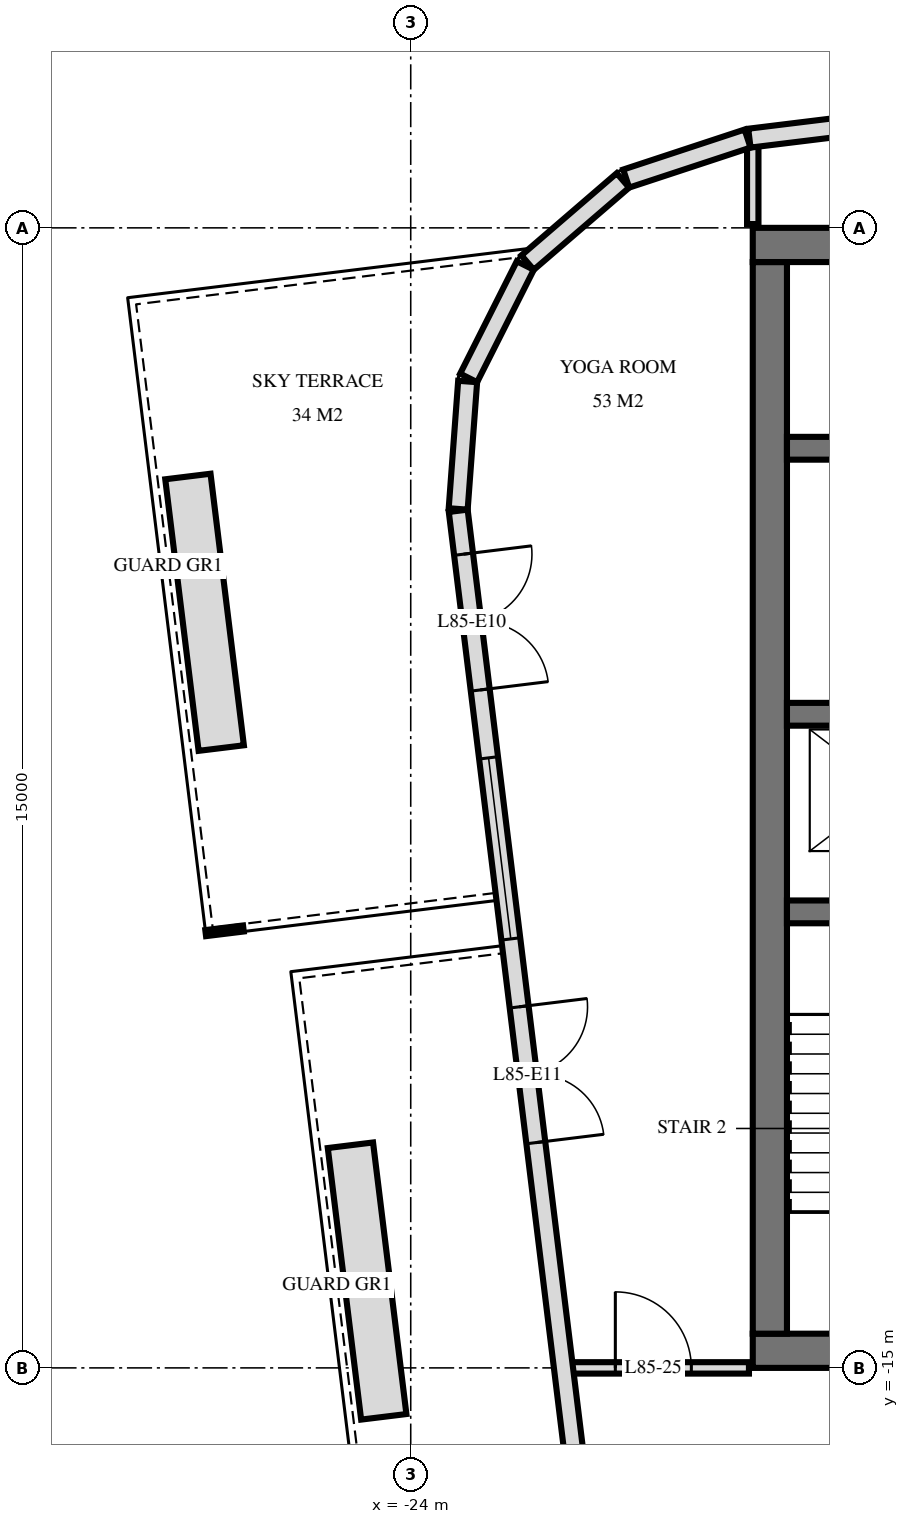
"""IFC4 building model, lengths in metres.
Left out: names, types, materials, properties, quantities, classifications, styles, units other than length and angle.
Written with IfcOpenShell. Run it as: python <this file> out.ifc"""

import sys

from ifc_helpers import new_model, si_unit, direction, frame, frame_2d, origin, place, context, subcontext, project, spatial, rectangle, extrude, element, fill, save


model = new_model("IFC4")
c1 = context("Model", 3, precision=1e-05, world=origin(), true_north=direction((0.0, 1.0)))
c2 = subcontext(c1, "Body", "Model", "MODEL_VIEW")
j1 = project(units=[si_unit("LENGTHUNIT", "METRE"), si_unit("PLANEANGLEUNIT", "RADIAN")], contexts=[c1])
p1 = place(None, origin())
s1 = spatial("IfcSite", under=j1, at=p1, CompositionType="ELEMENT")
p2 = place(p1, origin())
s2 = spatial("IfcBuilding", under=s1, at=p2, CompositionType="ELEMENT")
p3 = place(p2, frame((0.0, 0.0, 322.6)))
s3 = spatial("IfcBuildingStorey", under=s2, at=p3, CompositionType="ELEMENT", Elevation=322.6)
p4 = place(p3, frame((-19.5, -0.225, 0.0), z_axis=(0.0, 0.0, 1.0), x_axis=(1.0, 0.0, 0.0)))
e1 = element("IfcWall", 1, at=p4, inside=s3, PredefinedType="SHEAR", context=c2, shape_type="SweptSolid", body=[
    extrude(rectangle(XDim=9.5, YDim=0.45, at=frame_2d((4.75, 0.0))), origin(), (0.0, 0.0, 1.0), 4.0),
])
p5 = place(p3, frame((-19.5, -14.775, 0.0), z_axis=(0.0, 0.0, 1.0), x_axis=(1.0, 0.0, 0.0)))
e2 = element("IfcWall", 2, at=p5, inside=s3, PredefinedType="SHEAR", context=c2, shape_type="SweptSolid", body=[
    extrude(rectangle(XDim=9.5, YDim=0.45, at=frame_2d((4.75, 0.0))), origin(), (0.0, 0.0, 1.0), 4.0),
])
p6 = place(p5, frame((1.2, 0.0, 0.0)))
e3 = element("IfcOpeningElement", 3, at=p6, cuts=e2, PredefinedType="OPENING", context=c2, shape_type="SweptSolid", body=[
    extrude(rectangle(XDim=1.2, YDim=2.1, at=frame_2d((0.6, 1.05))), frame((0.0, 0.235, 0.0), z_axis=(0.0, -1.0, 0.0), x_axis=(1.0, 0.0, 0.0)), (0.0, 0.0, 1.0), 0.47),
])
p7 = place(p5, frame((4.25, 0.0, 0.0)))
e4 = element("IfcOpeningElement", 4, at=p7, cuts=e2, PredefinedType="OPENING", context=c2, shape_type="SweptSolid", body=[
    extrude(rectangle(XDim=1.1, YDim=2.1, at=frame_2d((0.55, 1.05))), frame((0.0, 0.235, 0.0), z_axis=(0.0, -1.0, 0.0), x_axis=(1.0, 0.0, 0.0)), (0.0, 0.0, 1.0), 0.47),
])
p8 = place(p3, frame((-19.275, -14.55, 0.0), z_axis=(0.0, 0.0, 1.0), x_axis=(0.0, 1.0, 0.0)))
e5 = element("IfcWall", 5, at=p8, inside=s3, PredefinedType="SHEAR", context=c2, shape_type="SweptSolid", body=[
    extrude(rectangle(XDim=14.1, YDim=0.45, at=frame_2d((7.05, 0.0))), origin(), (0.0, 0.0, 1.0), 4.0),
])
p9 = place(p3, frame((-19.05, -2.9, 0.0), z_axis=(0.0, 0.0, 1.0), x_axis=(1.0, 0.0, 0.0)))
e6 = element("IfcWall", 6, at=p9, inside=s3, PredefinedType="SHEAR", context=c2, shape_type="SweptSolid", body=[
    extrude(rectangle(XDim=8.7, YDim=0.3, at=frame_2d((4.35, 0.0))), origin(), (0.0, 0.0, 1.0), 4.0),
])
p10 = place(p9, frame((6.8, 0.0, 0.0)))
e7 = element("IfcOpeningElement", 7, at=p10, cuts=e6, PredefinedType="OPENING", context=c2, shape_type="SweptSolid", body=[
    extrude(rectangle(XDim=1.1, YDim=2.1, at=frame_2d((0.55, 1.05))), frame((0.0, 0.16, 0.0), z_axis=(0.0, -1.0, 0.0), x_axis=(1.0, 0.0, 0.0)), (0.0, 0.0, 1.0), 0.32),
])
p11 = place(p9, frame((3.8, 0.0, 0.0)))
e8 = element("IfcOpeningElement", 8, at=p11, cuts=e6, PredefinedType="OPENING", context=c2, shape_type="SweptSolid", body=[
    extrude(rectangle(XDim=1.1, YDim=2.1, at=frame_2d((0.55, 1.05))), frame((0.0, 0.16, 0.0), z_axis=(0.0, -1.0, 0.0), x_axis=(1.0, 0.0, 0.0)), (0.0, 0.0, 1.0), 0.32),
])
p12 = place(p9, frame((0.9, 0.0, 0.0)))
e9 = element("IfcOpeningElement", 9, at=p12, cuts=e6, PredefinedType="OPENING", context=c2, shape_type="SweptSolid", body=[
    extrude(rectangle(XDim=0.9, YDim=2.1, at=frame_2d((0.45, 1.05))), frame((0.0, 0.16, 0.0), z_axis=(0.0, -1.0, 0.0), x_axis=(1.0, 0.0, 0.0)), (0.0, 0.0, 1.0), 0.32),
])
p13 = place(p3, frame((-19.05, -6.4, 0.0), z_axis=(0.0, 0.0, 1.0), x_axis=(1.0, 0.0, 0.0)))
e10 = element("IfcWall", 10, at=p13, inside=s3, PredefinedType="SHEAR", context=c2, shape_type="SweptSolid", body=[
    extrude(rectangle(XDim=8.7, YDim=0.3, at=frame_2d((4.35, 0.0))), origin(), (0.0, 0.0, 1.0), 4.0),
])
p14 = place(p13, frame((0.8, 0.0, 0.0)))
e11 = element("IfcOpeningElement", 11, at=p14, cuts=e10, PredefinedType="OPENING", context=c2, shape_type="SweptSolid", body=[
    extrude(rectangle(XDim=1.1, YDim=2.1, at=frame_2d((0.55, 1.05))), frame((0.0, 0.16, 0.0), z_axis=(0.0, -1.0, 0.0), x_axis=(1.0, 0.0, 0.0)), (0.0, 0.0, 1.0), 0.32),
])
p15 = place(p3, frame((-19.05, -9.0, 0.0), z_axis=(0.0, 0.0, 1.0), x_axis=(1.0, 0.0, 0.0)))
e12 = element("IfcWall", 12, at=p15, inside=s3, PredefinedType="SHEAR", context=c2, shape_type="SweptSolid", body=[
    extrude(rectangle(XDim=8.7, YDim=0.3, at=frame_2d((4.35, 0.0))), origin(), (0.0, 0.0, 1.0), 4.0),
])
p16 = place(p15, frame((3.8, 0.0, 0.0)))
e13 = element("IfcOpeningElement", 13, at=p16, cuts=e12, PredefinedType="OPENING", context=c2, shape_type="SweptSolid", body=[
    extrude(rectangle(XDim=1.1, YDim=2.1, at=frame_2d((0.55, 1.05))), frame((0.0, 0.16, 0.0), z_axis=(0.0, -1.0, 0.0), x_axis=(1.0, 0.0, 0.0)), (0.0, 0.0, 1.0), 0.32),
])
p17 = place(p3, frame((16.138, 5.561, 0.0), z_axis=(0.0, 0.0, 1.0), x_axis=(-0.992546726876, -0.121864658405, 0.0)))
e14 = element("IfcWall", 14, at=p17, inside=s3, PredefinedType="SOLIDWALL", context=c2, shape_type="SweptSolid", body=[
    extrude(rectangle(XDim=35.951, YDim=0.25, at=frame_2d((17.975, 0.0))), origin(), (0.0, 0.0, 1.0), 3.72),
])
p18 = place(p17, frame((12.275, 0.0, 0.0)))
e15 = element("IfcOpeningElement", 15, at=p18, cuts=e14, PredefinedType="OPENING", context=c2, shape_type="SweptSolid", body=[
    extrude(rectangle(XDim=2.4, YDim=2.4, at=frame_2d((1.2, 1.2))), frame((0.0, 0.135, 0.0), z_axis=(0.0, -1.0, 0.0), x_axis=(1.0, 0.0, 0.0)), (0.0, 0.0, 1.0), 0.27),
])
p19 = place(p17, frame((17.865, 0.0, 0.0)))
e16 = element("IfcOpeningElement", 16, at=p19, cuts=e14, PredefinedType="OPENING", context=c2, shape_type="SweptSolid", body=[
    extrude(rectangle(XDim=2.4, YDim=2.4, at=frame_2d((1.2, 1.2))), frame((0.0, 0.135, 0.0), z_axis=(0.0, -1.0, 0.0), x_axis=(1.0, 0.0, 0.0)), (0.0, 0.0, 1.0), 0.27),
])
p20 = place(p17, frame((21.275, 0.0, 0.0)))
e17 = element("IfcOpeningElement", 17, at=p20, cuts=e14, PredefinedType="OPENING", context=c2, shape_type="SweptSolid", body=[
    extrude(rectangle(XDim=2.4, YDim=2.4, at=frame_2d((1.2, 1.2))), frame((0.0, 0.135, 0.0), z_axis=(0.0, -1.0, 0.0), x_axis=(1.0, 0.0, 0.0)), (0.0, 0.0, 1.0), 0.27),
])
p21 = place(p3, frame((-19.568, 1.175, 0.0), z_axis=(0.0, 0.0, 1.0), x_axis=(-0.949694735798, -0.313177120489, 0.0)))
e18 = element("IfcWall", 18, at=p21, inside=s3, PredefinedType="SOLIDWALL", context=c2, shape_type="SweptSolid", body=[
    extrude(rectangle(XDim=1.681, YDim=0.25, at=frame_2d((0.841, 0.0))), origin(), (0.0, 0.0, 1.0), 3.72),
])
p22 = place(p3, frame((-21.208, 0.624, 0.0), z_axis=(0.0, 0.0, 1.0), x_axis=(-0.757568315466, -0.652755886531, 0.0)))
e19 = element("IfcWall", 19, at=p22, inside=s3, PredefinedType="SOLIDWALL", context=c2, shape_type="SweptSolid", body=[
    extrude(rectangle(XDim=1.656, YDim=0.25, at=frame_2d((0.828, 0.0))), origin(), (0.0, 0.0, 1.0), 3.72),
])
p23 = place(p3, frame((-22.493, -0.495, 0.0), z_axis=(0.0, 0.0, 1.0), x_axis=(-0.449982385812, -0.893037430604, 0.0)))
e20 = element("IfcWall", 20, at=p23, inside=s3, PredefinedType="SOLIDWALL", context=c2, shape_type="SweptSolid", body=[
    extrude(rectangle(XDim=1.656, YDim=0.25, at=frame_2d((0.828, 0.0))), origin(), (0.0, 0.0, 1.0), 3.72),
])
p24 = place(p3, frame((-23.251, -2.021, 0.0), z_axis=(0.0, 0.0, 1.0), x_axis=(-0.074053534713, -0.997254267475, 0.0)))
e21 = element("IfcWall", 21, at=p24, inside=s3, PredefinedType="SOLIDWALL", context=c2, shape_type="SweptSolid", body=[
    extrude(rectangle(XDim=1.681, YDim=0.25, at=frame_2d((0.841, 0.0))), origin(), (0.0, 0.0, 1.0), 3.72),
])
p25 = place(p3, frame((-23.375, -3.723, 0.0), z_axis=(0.0, 0.0, 1.0), x_axis=(0.121862878281, -0.992546945437, 0.0)))
e22 = element("IfcWall", 22, at=p25, inside=s3, PredefinedType="SOLIDWALL", context=c2, shape_type="SweptSolid", body=[
    extrude(rectangle(XDim=19.151, YDim=0.25, at=frame_2d((9.575, 0.0))), origin(), (0.0, 0.0, 1.0), 3.72),
])
p26 = place(p25, frame((0.575, 0.0, 0.0)))
e23 = element("IfcOpeningElement", 23, at=p26, cuts=e22, PredefinedType="OPENING", context=c2, shape_type="SweptSolid", body=[
    extrude(rectangle(XDim=1.8, YDim=2.4, at=frame_2d((0.9, 1.2))), frame((0.0, 0.135, 0.0), z_axis=(0.0, -1.0, 0.0), x_axis=(1.0, 0.0, 0.0)), (0.0, 0.0, 1.0), 0.27),
])
p27 = place(p25, frame((3.275, 0.0, 0.0)))
e24 = element("IfcOpeningElement", 24, at=p27, cuts=e22, PredefinedType="OPENING", context=c2, shape_type="SweptSolid", body=[
    extrude(rectangle(XDim=2.4, YDim=2.4, at=frame_2d((1.2, 1.2))), frame((0.0, 0.135, 0.0), z_axis=(0.0, -1.0, 0.0), x_axis=(1.0, 0.0, 0.0)), (0.0, 0.0, 1.0), 0.27),
])
p28 = place(p25, frame((6.576, 0.0, 0.0)))
e25 = element("IfcOpeningElement", 25, at=p28, cuts=e22, PredefinedType="OPENING", context=c2, shape_type="SweptSolid", body=[
    extrude(rectangle(XDim=1.8, YDim=2.4, at=frame_2d((0.9, 1.2))), frame((0.0, 0.135, 0.0), z_axis=(0.0, -1.0, 0.0), x_axis=(1.0, 0.0, 0.0)), (0.0, 0.0, 1.0), 0.27),
])
p29 = place(p25, frame((15.775, 0.0, 0.0)))
e26 = element("IfcOpeningElement", 26, at=p29, cuts=e22, PredefinedType="OPENING", context=c2, shape_type="SweptSolid", body=[
    extrude(rectangle(XDim=1.8, YDim=2.4, at=frame_2d((0.9, 1.2))), frame((0.0, 0.135, 0.0), z_axis=(0.0, -1.0, 0.0), x_axis=(1.0, 0.0, 0.0)), (0.0, 0.0, 1.0), 0.27),
])
for number, where, z_axis, x_axis in (
    (27, (-24.355, -15.644, 0.0), (0.0, 0.0, 1.0), (-0.122, 0.993, 0.0)),
    (28, (-26.493, -6.845, 0.0), (0.0, 0.0, 1.0), (-0.122, 0.993, 0.0)),
):
    element("IfcWall", number, at=place(p3, frame(where, z_axis=z_axis, x_axis=x_axis)), inside=s3, PredefinedType="USERDEFINED", context=c2, shape_type="SweptSolid", body=[
        extrude(rectangle(XDim=3.6, YDim=0.6, at=frame_2d((1.8, 0.0))), origin(), (0.0, 0.0, 1.0), 0.65),
    ])
p30 = place(p3, frame((-19.5, 0.05, 0.0), z_axis=(0.0, 0.0, 1.0), x_axis=(0.0, 1.0, 0.0)))
e29 = element("IfcWall", 29, at=p30, inside=s3, PredefinedType="PARTITIONING", context=c2, shape_type="SweptSolid", body=[
    extrude(rectangle(XDim=1.08, YDim=0.15, at=frame_2d((0.54, 0.0))), origin(), (0.0, 0.0, 1.0), 3.72),
])
p31 = place(p3, frame((-21.935, -15.0, 0.0), z_axis=(0.0, 0.0, 1.0), x_axis=(1.0, 0.0, 0.0)))
e30 = element("IfcWall", 30, at=p31, inside=s3, PredefinedType="PARTITIONING", context=c2, shape_type="SweptSolid", body=[
    extrude(rectangle(XDim=2.385, YDim=0.15, at=frame_2d((1.192, 0.0))), origin(), (0.0, 0.0, 1.0), 3.72),
])
p32 = place(p31, frame((0.627, 0.0, 0.0)))
e31 = element("IfcOpeningElement", 31, at=p32, cuts=e30, PredefinedType="OPENING", context=c2, shape_type="SweptSolid", body=[
    extrude(rectangle(XDim=1.0, YDim=2.1, at=frame_2d((0.5, 1.05))), frame((0.0, 0.085, 0.0), z_axis=(0.0, -1.0, 0.0), x_axis=(1.0, 0.0, 0.0)), (0.0, 0.0, 1.0), 0.17),
])
p33 = place(p26, origin())
e32 = element("IfcDoor", 32, at=p33, inside=s3, OperationType="DOUBLE_DOOR_SINGLE_SWING", PredefinedType="DOOR", context=c2, shape_type="SweptSolid", body=[
    extrude(rectangle(XDim=1.8, YDim=2.4, at=frame_2d((0.9, 1.2))), frame((0.0, 0.025, 0.0), z_axis=(0.0, -1.0, 0.0), x_axis=(1.0, 0.0, 0.0)), (0.0, 0.0, 1.0), 0.05),
])
fill(e23, e32)
p34 = place(p27, origin())
e33 = element("IfcWindow", 33, at=p34, inside=s3, PartitioningType="SINGLE_PANEL", PredefinedType="WINDOW", context=c2, shape_type="SweptSolid", body=[
    extrude(rectangle(XDim=2.4, YDim=2.4, at=frame_2d((1.2, 1.2))), frame((0.0, 0.03, 0.0), z_axis=(0.0, -1.0, 0.0), x_axis=(1.0, 0.0, 0.0)), (0.0, 0.0, 1.0), 0.06),
])
fill(e24, e33)
p35 = place(p28, origin())
e34 = element("IfcDoor", 34, at=p35, inside=s3, OperationType="DOUBLE_DOOR_SINGLE_SWING", PredefinedType="DOOR", context=c2, shape_type="SweptSolid", body=[
    extrude(rectangle(XDim=1.8, YDim=2.4, at=frame_2d((0.9, 1.2))), frame((0.0, 0.025, 0.0), z_axis=(0.0, -1.0, 0.0), x_axis=(1.0, 0.0, 0.0)), (0.0, 0.0, 1.0), 0.05),
])
fill(e25, e34)
p36 = place(p32, origin())
e35 = element("IfcDoor", 35, at=p36, inside=s3, OperationType="SINGLE_SWING_RIGHT", PredefinedType="DOOR", context=c2, shape_type="SweptSolid", body=[
    extrude(rectangle(XDim=1.0, YDim=2.1, at=frame_2d((0.5, 1.05))), frame((0.0, 0.025, 0.0), z_axis=(0.0, -1.0, 0.0), x_axis=(1.0, 0.0, 0.0)), (0.0, 0.0, 1.0), 0.05),
])
fill(e31, e35)
save(model, sys.argv[1])
